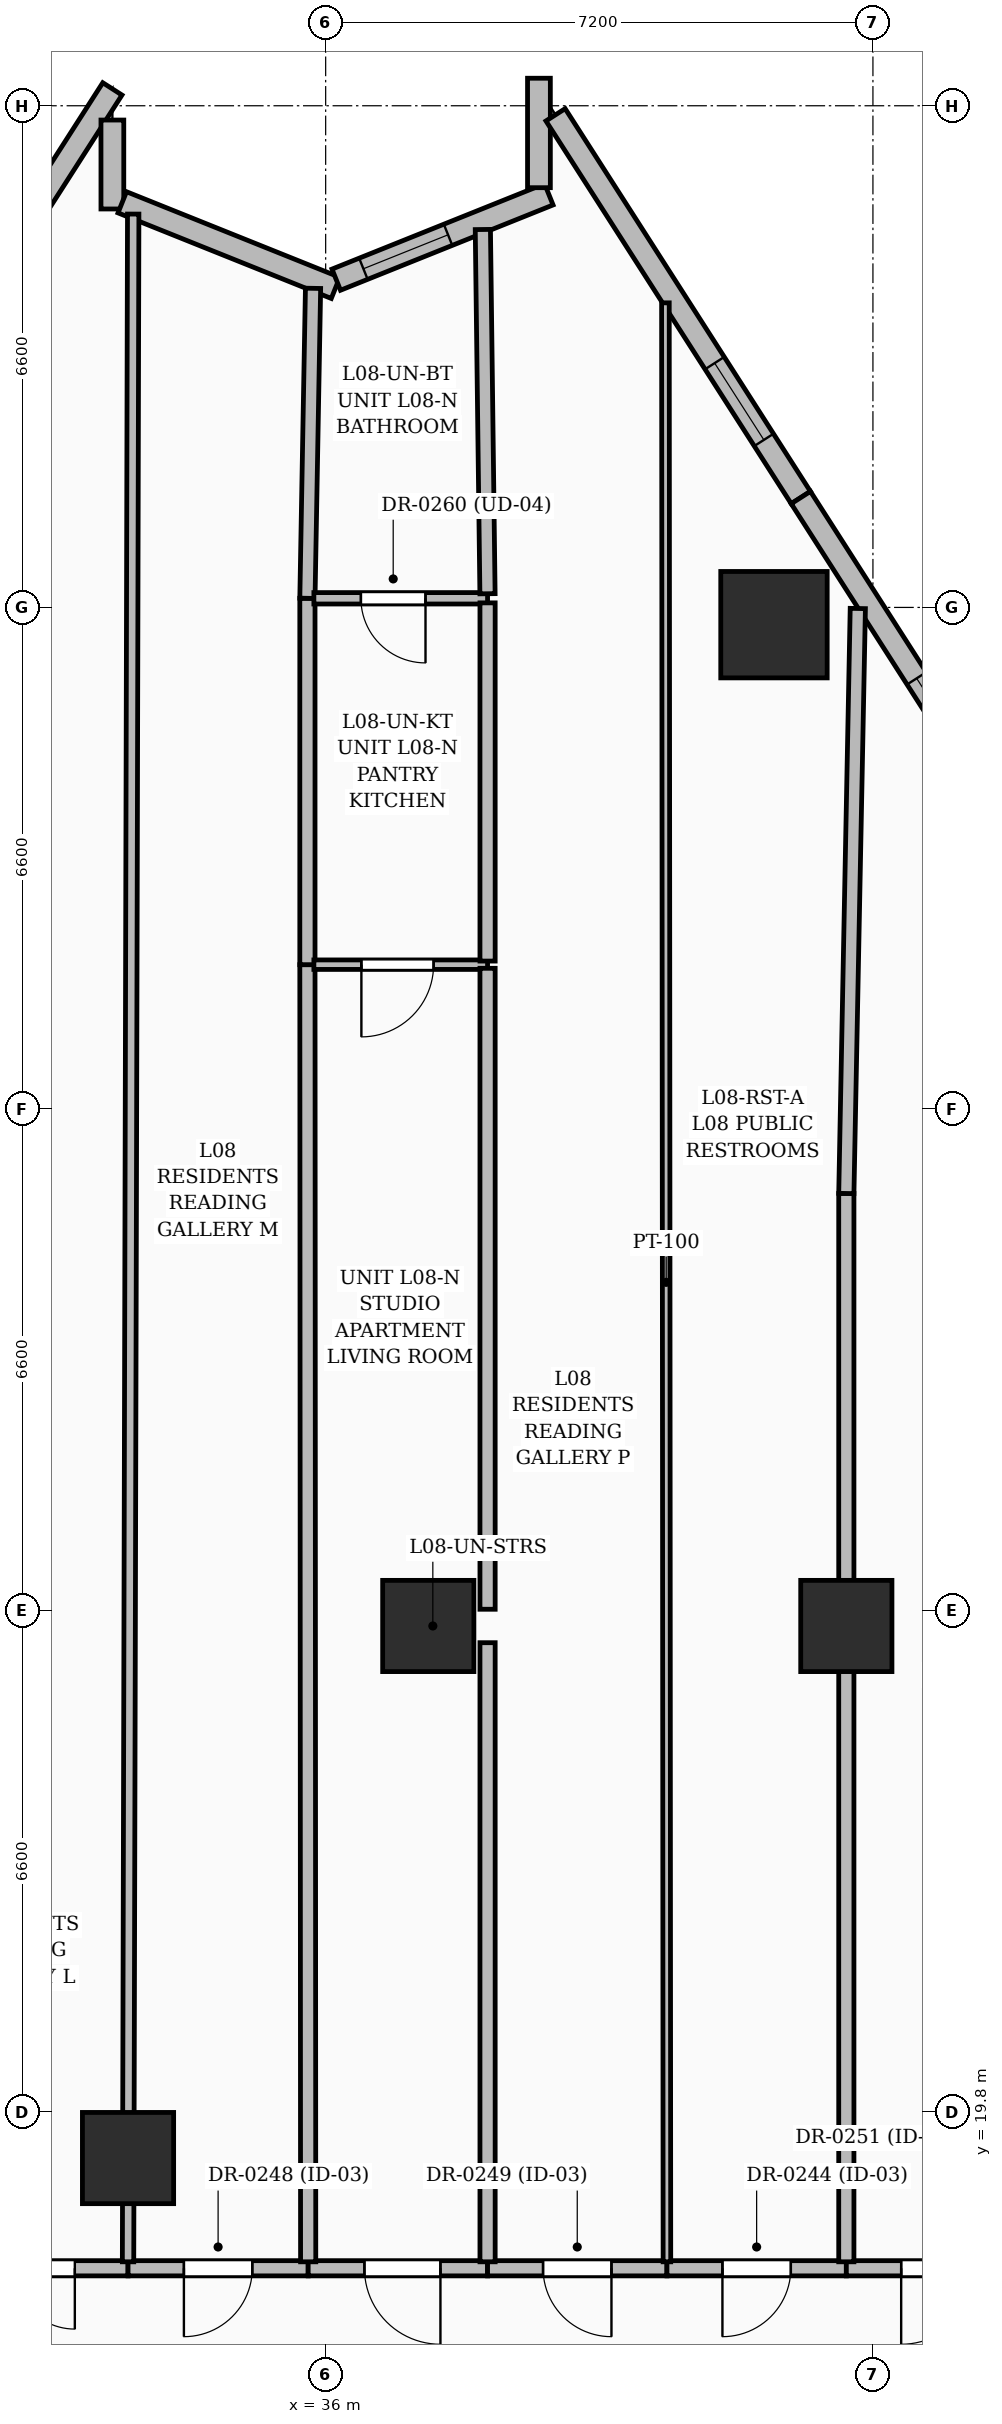
"""IFC4 building model, lengths in metres.
Left out: names, types, materials, properties, quantities, classifications, styles, units other than length and angle.
Written with IfcOpenShell. Run it as: python <this file> out.ifc"""

import sys

from ifc_helpers import new_model, si_unit, direction, frame, frame_2d, origin, origin_2d, place, context, subcontext, project, spatial, rectangle, extrude, element, fill, save


model = new_model("IFC4")
c1 = context("Model", 3, precision=1e-05, world=origin(), true_north=direction((0.0, 1.0)))
c2 = subcontext(c1, "Body", "Model", "MODEL_VIEW")
j1 = project(units=[si_unit("LENGTHUNIT", "METRE"), si_unit("PLANEANGLEUNIT", "RADIAN")], contexts=[c1])
p1 = place(None, origin())
s1 = spatial("IfcSite", under=j1, at=p1, CompositionType="ELEMENT")
p2 = place(p1, origin())
s2 = spatial("IfcBuilding", under=s1, at=p2, CompositionType="ELEMENT")
p3 = place(p2, frame((0.0, 0.0, 39.0)))
s3 = spatial("IfcBuildingStorey", under=s2, at=p3, CompositionType="ELEMENT", Elevation=39.0)
for number, where, z_axis, x_axis in (
    (1, (42.85, 26.2, 0.0), (0.0, 0.0, 1.0), (1.0, 0.0, 0.0)),
    (2, (37.35, 26.2, 0.0), (0.0, 0.0, 1.0), (1.0, 0.0, 0.0)),
    (3, (33.4, 19.2, 0.0), (0.0, 0.0, 1.0), (1.0, 0.0, 0.0)),
):
    element("IfcColumn", number, at=place(p3, frame(where, z_axis=z_axis, x_axis=x_axis)), inside=s3, PredefinedType="COLUMN", context=c2, shape_type="SweptSolid", body=[
        extrude(rectangle(XDim=1.2, YDim=1.2, at=origin_2d()), origin(), (0.0, 0.0, 1.0), 3.6),
    ])
p4 = place(p3, frame((41.898, 39.373, 0.0), z_axis=(0.0, 0.0, 1.0), x_axis=(1.0, 0.0, 0.0)))
e4 = element("IfcColumn", 4, at=p4, inside=s3, PredefinedType="COLUMN", context=c2, shape_type="SweptSolid", body=[
    extrude(rectangle(XDim=1.4, YDim=1.4, at=origin_2d()), origin(), (0.0, 0.0, 1.0), 3.6),
])
p5 = place(p3, frame((29.925, 41.321, 0.0), z_axis=(0.0, 0.0, 1.0), x_axis=(0.53953502124, 0.841963158847, 0.0)))
e5 = element("IfcWall", 5, at=p5, inside=s3, PredefinedType="SOLIDWALL", context=c2, shape_type="SweptSolid", body=[
    extrude(rectangle(XDim=6.059, YDim=0.3, at=frame_2d((3.029, 0.0))), origin(), (0.0, 0.0, 1.0), 3.35),
])
p6 = place(p3, frame((33.194, 46.012, 0.0), z_axis=(0.0, 0.0, 1.0), x_axis=(0.0, -1.0, 0.0)))
e6 = element("IfcWall", 6, at=p6, inside=s3, PredefinedType="SOLIDWALL", context=c2, shape_type="SweptSolid", body=[
    extrude(rectangle(XDim=1.17, YDim=0.3, at=frame_2d((0.585, 0.0))), origin(), (0.0, 0.0, 1.0), 3.35),
])
p7 = place(p3, frame((33.324, 44.93, 0.0), z_axis=(0.0, 0.0, 1.0), x_axis=(0.928091921944, -0.372351157407, 0.0)))
e7 = element("IfcWall", 7, at=p7, inside=s3, PredefinedType="SOLIDWALL", context=c2, shape_type="SweptSolid", body=[
    extrude(rectangle(XDim=3.023, YDim=0.3, at=frame_2d((1.512, 0.0))), origin(), (0.0, 0.0, 1.0), 3.35),
])
p8 = place(p3, frame((36.139, 43.912, 0.0), z_axis=(0.0, 0.0, 1.0), x_axis=(0.928057043086, 0.372438081804, 0.0)))
e8 = element("IfcWall", 8, at=p8, inside=s3, PredefinedType="SOLIDWALL", context=c2, shape_type="SweptSolid", body=[
    extrude(rectangle(XDim=3.013, YDim=0.3, at=frame_2d((1.507, 0.0))), origin(), (0.0, 0.0, 1.0), 3.35),
])
p9 = place(p8, frame((0.385, 0.0, 0.8)))
e9 = element("IfcOpeningElement", 9, at=p9, cuts=e8, PredefinedType="OPENING", context=c2, shape_type="SweptSolid", body=[
    extrude(rectangle(XDim=1.2, YDim=1.8, at=frame_2d((0.6, 0.9))), frame((0.0, 0.16, 0.0), z_axis=(0.0, -1.0, 0.0), x_axis=(1.0, 0.0, 0.0)), (0.0, 0.0, 1.0), 0.32),
])
p10 = place(p3, frame((38.806, 45.122, 0.0), z_axis=(0.0, 0.0, 1.0), x_axis=(0.0, 1.0, 0.0)))
e10 = element("IfcWall", 10, at=p10, inside=s3, PredefinedType="SOLIDWALL", context=c2, shape_type="SweptSolid", body=[
    extrude(rectangle(XDim=1.44, YDim=0.3, at=frame_2d((0.72, 0.0))), origin(), (0.0, 0.0, 1.0), 3.35),
])
p11 = place(p3, frame((39.024, 46.081, 0.0), z_axis=(0.0, 0.0, 1.0), x_axis=(0.539527381639, -0.8419680543, 0.0)))
e11 = element("IfcWall", 11, at=p11, inside=s3, PredefinedType="SOLIDWALL", context=c2, shape_type="SweptSolid", body=[
    extrude(rectangle(XDim=5.981, YDim=0.3, at=frame_2d((2.99, 0.0))), origin(), (0.0, 0.0, 1.0), 3.35),
])
p12 = place(p11, frame((3.88, 0.0, 0.8)))
e12 = element("IfcOpeningElement", 12, at=p12, cuts=e11, PredefinedType="OPENING", context=c2, shape_type="SweptSolid", body=[
    extrude(rectangle(XDim=1.2, YDim=1.8, at=frame_2d((0.6, 0.9))), frame((0.0, 0.16, 0.0), z_axis=(0.0, -1.0, 0.0), x_axis=(1.0, 0.0, 0.0)), (0.0, 0.0, 1.0), 0.32),
])
p13 = place(p3, frame((42.251, 41.045, 0.0), z_axis=(0.0, 0.0, 1.0), x_axis=(0.539526045631, -0.841968910403, 0.0)))
e13 = element("IfcWall", 13, at=p13, inside=s3, PredefinedType="SOLIDWALL", context=c2, shape_type="SweptSolid", body=[
    extrude(rectangle(XDim=6.526, YDim=0.3, at=frame_2d((3.263, 0.0))), origin(), (0.0, 0.0, 1.0), 3.35),
])
p14 = place(p13, frame((2.825, 0.0, 0.6)))
e14 = element("IfcOpeningElement", 14, at=p14, cuts=e13, PredefinedType="OPENING", context=c2, shape_type="SweptSolid", body=[
    extrude(rectangle(XDim=2.4, YDim=2.1, at=frame_2d((1.2, 1.05))), frame((0.0, 0.16, 0.0), z_axis=(0.0, -1.0, 0.0), x_axis=(1.0, 0.0, 0.0)), (0.0, 0.0, 1.0), 0.32),
])
p15 = place(p3, frame((33.4, 17.75, 0.0), z_axis=(0.0, 0.0, 1.0), x_axis=(-1.0, 0.0, 0.0)))
e15 = element("IfcWall", 15, at=p15, inside=s3, PredefinedType="PARTITIONING", context=c2, shape_type="SweptSolid", body=[
    extrude(rectangle(XDim=3.0, YDim=0.2, at=frame_2d((1.5, 0.0))), origin(), (0.0, 0.0, 1.0), 3.35),
])
p16 = place(p15, frame((0.7, 0.0, 0.0)))
e16 = element("IfcOpeningElement", 16, at=p16, cuts=e15, PredefinedType="OPENING", context=c2, shape_type="SweptSolid", body=[
    extrude(rectangle(XDim=1.6, YDim=2.3, at=frame_2d((0.8, 1.15))), frame((0.0, 0.11, 0.0), z_axis=(0.0, -1.0, 0.0), x_axis=(1.0, 0.0, 0.0)), (0.0, 0.0, 1.0), 0.22),
])
p17 = place(p3, frame((35.77, 17.75, 0.0), z_axis=(0.0, 0.0, 1.0), x_axis=(-1.0, 0.0, 0.0)))
e17 = element("IfcWall", 17, at=p17, inside=s3, PredefinedType="PARTITIONING", context=c2, shape_type="SweptSolid", body=[
    extrude(rectangle(XDim=2.37, YDim=0.2, at=frame_2d((1.185, 0.0))), origin(), (0.0, 0.0, 1.0), 2.309),
])
p18 = place(p17, frame((0.735, 0.0, 0.0)))
e18 = element("IfcOpeningElement", 18, at=p18, cuts=e17, PredefinedType="OPENING", context=c2, shape_type="SweptSolid", body=[
    extrude(rectangle(XDim=0.9, YDim=2.1, at=frame_2d((0.45, 1.05))), frame((0.0, 0.11, 0.0), z_axis=(0.0, -1.0, 0.0), x_axis=(1.0, 0.0, 0.0)), (0.0, 0.0, 1.0), 0.22),
])
p19 = place(p3, frame((38.13, 17.75, 0.0), z_axis=(0.0, 0.0, 1.0), x_axis=(-1.0, 0.0, 0.0)))
e19 = element("IfcWall", 19, at=p19, inside=s3, PredefinedType="PARTITIONING", context=c2, shape_type="SweptSolid", body=[
    extrude(rectangle(XDim=2.36, YDim=0.2, at=frame_2d((1.18, 0.0))), origin(), (0.0, 0.0, 1.0), 3.35),
])
p20 = place(p19, frame((0.62, 0.0, 0.0)))
e20 = element("IfcOpeningElement", 20, at=p20, cuts=e19, PredefinedType="OPENING", context=c2, shape_type="SweptSolid", body=[
    extrude(rectangle(XDim=1.0, YDim=2.2, at=frame_2d((0.5, 1.1))), frame((0.0, 0.11, 0.0), z_axis=(0.0, -1.0, 0.0), x_axis=(1.0, 0.0, 0.0)), (0.0, 0.0, 1.0), 0.22),
])
p21 = place(p3, frame((40.49, 17.75, 0.0), z_axis=(0.0, 0.0, 1.0), x_axis=(-1.0, 0.0, 0.0)))
e21 = element("IfcWall", 21, at=p21, inside=s3, PredefinedType="PARTITIONING", context=c2, shape_type="SweptSolid", body=[
    extrude(rectangle(XDim=2.36, YDim=0.2, at=frame_2d((1.18, 0.0))), origin(), (0.0, 0.0, 1.0), 3.35),
])
p22 = place(p21, frame((0.73, 0.0, 0.0)))
e22 = element("IfcOpeningElement", 22, at=p22, cuts=e21, PredefinedType="OPENING", context=c2, shape_type="SweptSolid", body=[
    extrude(rectangle(XDim=0.9, YDim=2.1, at=frame_2d((0.45, 1.05))), frame((0.0, 0.11, 0.0), z_axis=(0.0, -1.0, 0.0), x_axis=(1.0, 0.0, 0.0)), (0.0, 0.0, 1.0), 0.22),
])
p23 = place(p3, frame((42.85, 17.75, 0.0), z_axis=(0.0, 0.0, 1.0), x_axis=(-1.0, 0.0, 0.0)))
e23 = element("IfcWall", 23, at=p23, inside=s3, PredefinedType="PARTITIONING", context=c2, shape_type="SweptSolid", body=[
    extrude(rectangle(XDim=2.36, YDim=0.2, at=frame_2d((1.18, 0.0))), origin(), (0.0, 0.0, 1.0), 3.35),
])
p24 = place(p23, frame((0.73, 0.0, 0.0)))
e24 = element("IfcOpeningElement", 24, at=p24, cuts=e23, PredefinedType="OPENING", context=c2, shape_type="SweptSolid", body=[
    extrude(rectangle(XDim=0.9, YDim=2.1, at=frame_2d((0.45, 1.05))), frame((0.0, 0.11, 0.0), z_axis=(0.0, -1.0, 0.0), x_axis=(1.0, 0.0, 0.0)), (0.0, 0.0, 1.0), 0.22),
])
p25 = place(p3, frame((47.27, 17.75, 0.0), z_axis=(0.0, 0.0, 1.0), x_axis=(-1.0, 0.0, 0.0)))
e25 = element("IfcWall", 25, at=p25, inside=s3, PredefinedType="PARTITIONING", context=c2, shape_type="SweptSolid", body=[
    extrude(rectangle(XDim=4.42, YDim=0.2, at=frame_2d((2.21, 0.0))), origin(), (0.0, 0.0, 1.0), 2.309),
])
p26 = place(p25, frame((2.698, 0.0, 0.0)))
e26 = element("IfcOpeningElement", 26, at=p26, cuts=e25, PredefinedType="OPENING", context=c2, shape_type="SweptSolid", body=[
    extrude(rectangle(XDim=1.0, YDim=2.2, at=frame_2d((0.5, 1.1))), frame((0.0, 0.11, 0.0), z_axis=(0.0, -1.0, 0.0), x_axis=(1.0, 0.0, 0.0)), (0.0, 0.0, 1.0), 0.22),
])
p27 = place(p3, frame((33.4, 17.835, 0.0), z_axis=(0.0, 0.0, 1.0), x_axis=(0.002519340237, 0.999996826457, 0.0)))
e27 = element("IfcWall", 27, at=p27, inside=s3, PredefinedType="PARTITIONING", context=c2, shape_type="SweptSolid", body=[
    extrude(rectangle(XDim=26.94, YDim=0.15, at=frame_2d((13.47, 0.0))), origin(), (0.0, 0.0, 1.0), 2.279),
])
p28 = place(p3, frame((35.77, 17.835, 0.0), z_axis=(0.0, 0.0, 1.0), x_axis=(-0.0005865689, 0.999999827968, 0.0)))
e28 = element("IfcWall", 28, at=p28, inside=s3, PredefinedType="PARTITIONING", context=c2, shape_type="SweptSolid", body=[
    extrude(rectangle(XDim=17.065, YDim=0.2, at=frame_2d((8.532, 0.0))), origin(), (0.0, 0.0, 1.0), 2.279),
])
p29 = place(p3, frame((35.76, 34.9, 0.0), z_axis=(0.0, 0.0, 1.0), x_axis=(0.0, 1.0, 0.0)))
e29 = element("IfcWall", 29, at=p29, inside=s3, PredefinedType="PARTITIONING", context=c2, shape_type="SweptSolid", body=[
    extrude(rectangle(XDim=4.82, YDim=0.2, at=frame_2d((2.41, 0.0))), origin(), (0.0, 0.0, 1.0), 2.37),
])
p30 = place(p3, frame((35.76, 39.72, 0.0), z_axis=(0.0, 0.0, 1.0), x_axis=(0.018136384294, 0.999835522256, 0.0)))
e30 = element("IfcWall", 30, at=p30, inside=s3, PredefinedType="PARTITIONING", context=c2, shape_type="SweptSolid", body=[
    extrude(rectangle(XDim=4.079, YDim=0.2, at=frame_2d((2.04, 0.0))), origin(), (0.0, 0.0, 1.0), 3.35),
])
p31 = place(p3, frame((38.13, 34.9, 0.0), z_axis=(0.0, 0.0, 1.0), x_axis=(-1.0, 0.0, 0.0)))
e31 = element("IfcWall", 31, at=p31, inside=s3, PredefinedType="PARTITIONING", context=c2, shape_type="SweptSolid", body=[
    extrude(rectangle(XDim=2.285, YDim=0.125, at=frame_2d((1.143, 0.0))), origin(), (0.0, 0.0, 1.0), 3.35),
])
p32 = place(p31, frame((0.71, 0.0, 0.0)))
e32 = element("IfcOpeningElement", 32, at=p32, cuts=e31, PredefinedType="OPENING", context=c2, shape_type="SweptSolid", body=[
    extrude(rectangle(XDim=0.95, YDim=2.2, at=frame_2d((0.475, 1.1))), frame((0.0, 0.072, 0.0), z_axis=(0.0, -1.0, 0.0), x_axis=(1.0, 0.0, 0.0)), (0.0, 0.0, 1.0), 0.145),
])
p33 = place(p3, frame((38.13, 17.835, 0.0), z_axis=(0.0, 0.0, 1.0), x_axis=(0.0, 1.0, 0.0)))
e33 = element("IfcWall", 33, at=p33, inside=s3, PredefinedType="PARTITIONING", context=c2, shape_type="SweptSolid", body=[
    extrude(rectangle(XDim=8.145, YDim=0.2, at=frame_2d((4.073, 0.0))), origin(), (0.0, 0.0, 1.0), 2.37),
])
p34 = place(p3, frame((38.13, 26.42, 0.0), z_axis=(0.0, 0.0, 1.0), x_axis=(0.0, 1.0, 0.0)))
e34 = element("IfcWall", 34, at=p34, inside=s3, PredefinedType="PARTITIONING", context=c2, shape_type="SweptSolid", body=[
    extrude(rectangle(XDim=8.433, YDim=0.2, at=frame_2d((4.216, 0.0))), origin(), (0.0, 0.0, 1.0), 2.37),
])
p35 = place(p3, frame((38.13, 39.72, 0.0), z_axis=(0.0, 0.0, 1.0), x_axis=(-1.0, 0.0, 0.0)))
e35 = element("IfcWall", 35, at=p35, inside=s3, PredefinedType="PARTITIONING", context=c2, shape_type="SweptSolid", body=[
    extrude(rectangle(XDim=2.285, YDim=0.15, at=frame_2d((1.143, 0.0))), origin(), (0.0, 0.0, 1.0), 2.37),
])
p36 = place(p35, frame((0.816, 0.0, 0.0)))
e36 = element("IfcOpeningElement", 36, at=p36, cuts=e35, PredefinedType="OPENING", context=c2, shape_type="SweptSolid", body=[
    extrude(rectangle(XDim=0.85, YDim=2.1, at=frame_2d((0.425, 1.05))), frame((0.0, 0.085, 0.0), z_axis=(0.0, -1.0, 0.0), x_axis=(1.0, 0.0, 0.0)), (0.0, 0.0, 1.0), 0.17),
])
p37 = place(p3, frame((38.13, 34.948, 0.0), z_axis=(0.0, 0.0, 1.0), x_axis=(0.0, 1.0, 0.0)))
e37 = element("IfcWall", 37, at=p37, inside=s3, PredefinedType="PARTITIONING", context=c2, shape_type="SweptSolid", body=[
    extrude(rectangle(XDim=4.712, YDim=0.2, at=frame_2d((2.356, 0.0))), origin(), (0.0, 0.0, 1.0), 2.37),
])
p38 = place(p3, frame((38.129, 39.78, 0.0), z_axis=(0.0, 0.0, 1.0), x_axis=(-0.01278680862, 0.999918245421, 0.0)))
e38 = element("IfcWall", 38, at=p38, inside=s3, PredefinedType="PARTITIONING", context=c2, shape_type="SweptSolid", body=[
    extrude(rectangle(XDim=4.792, YDim=0.2, at=frame_2d((2.396, 0.0))), origin(), (0.0, 0.0, 1.0), 3.35),
])
p39 = place(p3, frame((40.49, 17.835, 0.0), z_axis=(0.0, 0.0, 1.0), x_axis=(-0.000767321348, 0.999999705609, 0.0)))
e39 = element("IfcWall", 39, at=p39, inside=s3, PredefinedType="PARTITIONING", context=c2, shape_type="SweptSolid", body=[
    extrude(rectangle(XDim=25.772, YDim=0.1, at=frame_2d((12.886, 0.0))), origin(), (0.0, 0.0, 1.0), 2.37),
])
p40 = place(p3, frame((42.85, 17.835, 0.0), z_axis=(0.0, 0.0, 1.0), x_axis=(0.0, 1.0, 0.0)))
e40 = element("IfcWall", 40, at=p40, inside=s3, PredefinedType="PARTITIONING", context=c2, shape_type="SweptSolid", body=[
    extrude(rectangle(XDim=14.055, YDim=0.2, at=frame_2d((7.027, 0.0))), origin(), (0.0, 0.0, 1.0), 2.279),
])
p41 = place(p3, frame((42.85, 31.89, 0.0), z_axis=(0.0, 0.0, 1.0), x_axis=(0.019600966642, 0.999807882599, 0.0)))
e41 = element("IfcWall", 41, at=p41, inside=s3, PredefinedType="PARTITIONING", context=c2, shape_type="SweptSolid", body=[
    extrude(rectangle(XDim=7.698, YDim=0.2, at=frame_2d((3.849, 0.0))), origin(), (0.0, 0.0, 1.0), 2.37),
])
p42 = place(p9, origin())
e42 = element("IfcWindow", 42, at=p42, inside=s3, PartitioningType="SINGLE_PANEL", PredefinedType="WINDOW", context=c2, shape_type="SweptSolid", body=[
    extrude(rectangle(XDim=1.2, YDim=1.8, at=frame_2d((0.6, 0.9))), frame((0.0, 0.03, 0.0), z_axis=(0.0, -1.0, 0.0), x_axis=(1.0, 0.0, 0.0)), (0.0, 0.0, 1.0), 0.06),
])
fill(e9, e42)
p43 = place(p12, origin())
e43 = element("IfcWindow", 43, at=p43, inside=s3, PartitioningType="SINGLE_PANEL", PredefinedType="WINDOW", context=c2, shape_type="SweptSolid", body=[
    extrude(rectangle(XDim=1.2, YDim=1.8, at=frame_2d((0.6, 0.9))), frame((0.0, 0.03, 0.0), z_axis=(0.0, -1.0, 0.0), x_axis=(1.0, 0.0, 0.0)), (0.0, 0.0, 1.0), 0.06),
])
fill(e12, e43)
p44 = place(p14, origin())
e44 = element("IfcWindow", 44, at=p44, inside=s3, PartitioningType="SINGLE_PANEL", PredefinedType="WINDOW", context=c2, shape_type="SweptSolid", body=[
    extrude(rectangle(XDim=2.4, YDim=2.1, at=frame_2d((1.2, 1.05))), frame((0.0, 0.03, 0.0), z_axis=(0.0, -1.0, 0.0), x_axis=(1.0, 0.0, 0.0)), (0.0, 0.0, 1.0), 0.06),
])
fill(e14, e44)
p45 = place(p24, origin())
e45 = element("IfcDoor", 45, at=p45, inside=s3, OperationType="SINGLE_SWING_RIGHT", PredefinedType="DOOR", context=c2, shape_type="SweptSolid", body=[
    extrude(rectangle(XDim=0.9, YDim=2.1, at=frame_2d((0.45, 1.05))), frame((0.0, 0.025, 0.0), z_axis=(0.0, -1.0, 0.0), x_axis=(1.0, 0.0, 0.0)), (0.0, 0.0, 1.0), 0.05),
])
fill(e24, e45)
p46 = place(p16, origin())
e46 = element("IfcDoor", 46, at=p46, inside=s3, OperationType="DOUBLE_DOOR_SINGLE_SWING", PredefinedType="DOOR", context=c2, shape_type="SweptSolid", body=[
    extrude(rectangle(XDim=1.6, YDim=2.3, at=frame_2d((0.8, 1.15))), frame((0.0, 0.025, 0.0), z_axis=(0.0, -1.0, 0.0), x_axis=(1.0, 0.0, 0.0)), (0.0, 0.0, 1.0), 0.05),
])
fill(e16, e46)
p47 = place(p18, origin())
e47 = element("IfcDoor", 47, at=p47, inside=s3, OperationType="SINGLE_SWING_RIGHT", PredefinedType="DOOR", context=c2, shape_type="SweptSolid", body=[
    extrude(rectangle(XDim=0.9, YDim=2.1, at=frame_2d((0.45, 1.05))), frame((0.0, 0.025, 0.0), z_axis=(0.0, -1.0, 0.0), x_axis=(1.0, 0.0, 0.0)), (0.0, 0.0, 1.0), 0.05),
])
fill(e18, e47)
p48 = place(p22, origin())
e48 = element("IfcDoor", 48, at=p48, inside=s3, OperationType="SINGLE_SWING_LEFT", PredefinedType="DOOR", context=c2, shape_type="SweptSolid", body=[
    extrude(rectangle(XDim=0.9, YDim=2.1, at=frame_2d((0.45, 1.05))), frame((0.0, 0.025, 0.0), z_axis=(0.0, -1.0, 0.0), x_axis=(1.0, 0.0, 0.0)), (0.0, 0.0, 1.0), 0.05),
])
fill(e22, e48)
p49 = place(p26, origin())
e49 = element("IfcDoor", 49, at=p49, inside=s3, OperationType="SINGLE_SWING_RIGHT", PredefinedType="DOOR", context=c2, shape_type="SweptSolid", body=[
    extrude(rectangle(XDim=1.0, YDim=2.2, at=frame_2d((0.5, 1.1))), frame((0.0, 0.025, 0.0), z_axis=(0.0, -1.0, 0.0), x_axis=(1.0, 0.0, 0.0)), (0.0, 0.0, 1.0), 0.05),
])
fill(e26, e49)
p50 = place(p20, origin())
e50 = element("IfcDoor", 50, at=p50, inside=s3, OperationType="SINGLE_SWING_LEFT", PredefinedType="DOOR", context=c2, shape_type="SweptSolid", body=[
    extrude(rectangle(XDim=1.0, YDim=2.2, at=frame_2d((0.5, 1.1))), frame((0.0, 0.025, 0.0), z_axis=(0.0, -1.0, 0.0), x_axis=(1.0, 0.0, 0.0)), (0.0, 0.0, 1.0), 0.05),
])
fill(e20, e50)
p51 = place(p32, origin())
e51 = element("IfcDoor", 51, at=p51, inside=s3, OperationType="SINGLE_SWING_RIGHT", PredefinedType="DOOR", context=c2, shape_type="SweptSolid", body=[
    extrude(rectangle(XDim=0.95, YDim=2.2, at=frame_2d((0.475, 1.1))), frame((0.0, 0.025, 0.0), z_axis=(0.0, -1.0, 0.0), x_axis=(1.0, 0.0, 0.0)), (0.0, 0.0, 1.0), 0.05),
])
fill(e32, e51)
p52 = place(p36, origin())
e52 = element("IfcDoor", 52, at=p52, inside=s3, OperationType="SINGLE_SWING_LEFT", PredefinedType="DOOR", context=c2, shape_type="SweptSolid", body=[
    extrude(rectangle(XDim=0.85, YDim=2.1, at=frame_2d((0.425, 1.05))), frame((0.0, 0.025, 0.0), z_axis=(0.0, -1.0, 0.0), x_axis=(1.0, 0.0, 0.0)), (0.0, 0.0, 1.0), 0.05),
])
fill(e36, e52)
save(model, sys.argv[1])
